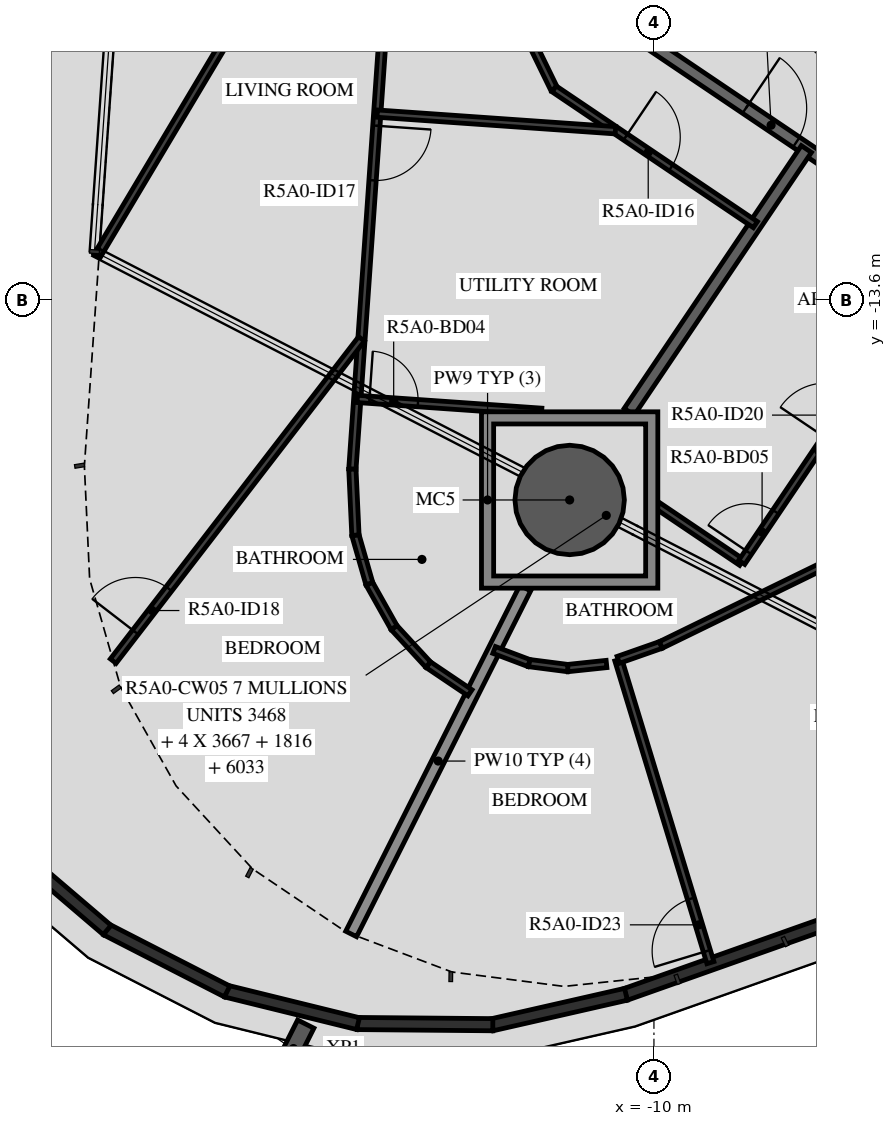
"""IFC4 building model, lengths in metres.
Left out: names, types, materials, properties, quantities, classifications, styles, units other than length and angle.
Written with IfcOpenShell. Run it as: python <this file> out.ifc"""

import sys

from ifc_helpers import new_model, si_unit, direction, frame, frame_2d, origin, origin_2d, place, context, subcontext, project, spatial, polyline, rectangle, hollow_circle, i_section, outline, extrude, element, fill, save


model = new_model("IFC4")
c1 = context("Model", 3, precision=1e-05, world=origin(), true_north=direction((0.0, 1.0)))
c2 = subcontext(c1, "Body", "Model", "MODEL_VIEW")
j1 = project(units=[si_unit("LENGTHUNIT", "METRE"), si_unit("PLANEANGLEUNIT", "RADIAN")], contexts=[c1])
p1 = place(None, origin())
s1 = spatial("IfcSite", under=j1, at=p1, CompositionType="ELEMENT")
p2 = place(p1, origin())
s2 = spatial("IfcBuilding", under=s1, at=p2, CompositionType="ELEMENT")
p3 = place(p2, frame((0.0, 0.0, 188.4)))
s3 = spatial("IfcBuildingStorey", under=s2, at=p3, CompositionType="ELEMENT", Elevation=188.4)
p4 = place(p3, frame((-11.386, -16.881, -0.45), z_axis=(0.0, 0.0, 1.0), x_axis=(1.0, 0.0, 0.0)))
e1 = element("IfcColumn", 1, at=p4, inside=s3, PredefinedType="COLUMN", context=c2, shape_type="SweptSolid", body=[
    extrude(hollow_circle(Radius=0.9, WallThickness=0.04, at=origin_2d()), origin(), (0.0, 0.0, 1.0), 3.57),
])
p5 = place(p3, frame((-15.928, -25.902, -0.45), z_axis=(0.0, 0.0, 1.0), x_axis=(-0.893169071277, 0.449721035881, 0.0)))
e2 = element("IfcColumn", 2, at=p5, inside=s3, PredefinedType="COLUMN", context=c2, shape_type="SweptSolid", body=[
    extrude(i_section(OverallWidth=0.3, OverallDepth=0.9, WebThickness=0.019, FlangeThickness=0.035, FilletRadius=0.03, at=origin_2d()), origin(), (0.0, 0.0, 1.0), 3.57),
])
p6 = place(p3, frame((6.704, -18.931, 0.03), z_axis=(0.0, 0.0, 1.0), x_axis=(-0.942641899569, -0.33380570573, 0.0)))
e3 = element("IfcWall", 3, at=p6, inside=s3, PredefinedType="PARAPET", context=c2, shape_type="SweptSolid", body=[
    extrude(rectangle(XDim=18.214, YDim=0.2, at=frame_2d((9.107, 0.0))), origin(), (0.0, 0.0, 1.0), 1.5),
])
p7 = place(p3, frame((-10.46, -25.01, 0.03), z_axis=(0.0, 0.0, 1.0), x_axis=(-0.97501799573, -0.222125883233, 0.0)))
e4 = element("IfcWall", 4, at=p7, inside=s3, PredefinedType="PARAPET", context=c2, shape_type="SweptSolid", body=[
    extrude(rectangle(XDim=2.258, YDim=0.2, at=frame_2d((1.129, 0.0))), origin(), (0.0, 0.0, 1.0), 1.5),
])
p8 = place(p3, frame((-12.65, -25.51, 0.03), z_axis=(0.0, 0.0, 1.0), x_axis=(-0.999961579411, 0.008765825811, 0.0)))
e5 = element("IfcWall", 5, at=p8, inside=s3, PredefinedType="PARAPET", context=c2, shape_type="SweptSolid", body=[
    extrude(rectangle(XDim=2.228, YDim=0.2, at=frame_2d((1.114, 0.0))), origin(), (0.0, 0.0, 1.0), 1.5),
])
p9 = place(p3, frame((-14.866, -25.492, 0.03), z_axis=(0.0, 0.0, 1.0), x_axis=(-0.971000010304, 0.239079442844, 0.0)))
e6 = element("IfcWall", 6, at=p9, inside=s3, PredefinedType="PARAPET", context=c2, shape_type="SweptSolid", body=[
    extrude(rectangle(XDim=2.228, YDim=0.2, at=frame_2d((1.114, 0.0))), origin(), (0.0, 0.0, 1.0), 1.5),
])
p10 = place(p3, frame((-17.019, -24.963, 0.03), z_axis=(0.0, 0.0, 1.0), x_axis=(-0.889733029007, 0.456481256015, 0.0)))
e7 = element("IfcWall", 7, at=p10, inside=s3, PredefinedType="PARAPET", context=c2, shape_type="SweptSolid", body=[
    extrude(rectangle(XDim=2.228, YDim=0.2, at=frame_2d((1.114, 0.0))), origin(), (0.0, 0.0, 1.0), 1.5),
])
p11 = place(p3, frame((-18.992, -23.952, 0.03), z_axis=(0.0, 0.0, 1.0), x_axis=(-0.760369169172, 0.649491128941, 0.0)))
e8 = element("IfcWall", 8, at=p11, inside=s3, PredefinedType="PARAPET", context=c2, shape_type="SweptSolid", body=[
    extrude(rectangle(XDim=2.228, YDim=0.2, at=frame_2d((1.114, 0.0))), origin(), (0.0, 0.0, 1.0), 1.5),
])
p12 = place(p3, frame((-23.066, -14.25, 0.03), z_axis=(0.0, 0.0, 1.0), x_axis=(0.182236609877, 0.983254706585, 0.0)))
e9 = element("IfcWall", 9, at=p12, inside=s3, PredefinedType="PARAPET", context=c2, shape_type="SweptSolid", body=[
    extrude(rectangle(XDim=36.429, YDim=0.2, at=frame_2d((18.214, 0.0))), origin(), (0.0, 0.0, 1.0), 1.5),
])
p13 = place(p3, frame((-10.47, -9.101, 0.0), z_axis=(0.0, 0.0, 1.0), x_axis=(0.829035841718, -0.559195469534, 0.0)))
e10 = element("IfcWall", 10, at=p13, inside=s3, PredefinedType="STANDARD", context=c2, shape_type="SweptSolid", body=[
    extrude(rectangle(XDim=7.181, YDim=0.2, at=frame_2d((3.591, 0.0))), origin(), (0.0, 0.0, 1.0), 3.12),
])
p14 = place(p13, frame((2.39, 0.0, 0.0)))
e11 = element("IfcOpeningElement", 11, at=p14, cuts=e10, PredefinedType="OPENING", context=c2, shape_type="SweptSolid", body=[
    extrude(rectangle(XDim=1.0, YDim=2.1, at=frame_2d((0.5, 1.05))), frame((0.0, 0.11, 0.0), z_axis=(0.0, -1.0, 0.0), x_axis=(1.0, 0.0, 0.0)), (0.0, 0.0, 1.0), 0.22),
])
p15 = place(p3, frame((-10.407, -15.43, 0.0), z_axis=(0.0, 0.0, 1.0), x_axis=(0.559038328133, 0.829141813973, 0.0)))
e12 = element("IfcWall", 12, at=p15, inside=s3, PredefinedType="STANDARD", context=c2, shape_type="SweptSolid", body=[
    extrude(rectangle(XDim=5.212, YDim=0.2, at=frame_2d((2.606, 0.0))), origin(), (0.0, 0.0, 1.0), 3.12),
])
p16 = place(p3, frame((-14.979, -24.017, 0.0), z_axis=(0.0, 0.0, 1.0), x_axis=(0.449711952388, 0.893173644864, 0.0)))
e13 = element("IfcWall", 13, at=p16, inside=s3, PredefinedType="STANDARD", context=c2, shape_type="SweptSolid", body=[
    extrude(rectangle(XDim=6.367, YDim=0.2, at=frame_2d((3.184, 0.0))), origin(), (0.0, 0.0, 1.0), 2.73),
])
p17 = place(p3, frame((-13.715, -5.87, 0.0), z_axis=(0.0, 0.0, 1.0), x_axis=(0.438372766482, -0.89879325632, 0.0)))
e14 = element("IfcWall", 14, at=p17, inside=s3, PredefinedType="PARTITIONING", context=c2, shape_type="SweptSolid", body=[
    extrude(rectangle(XDim=4.728, YDim=0.12, at=frame_2d((2.364, 0.0))), origin(), (0.0, 0.0, 1.0), 3.12),
])
p18 = place(p17, frame((0.4, 0.0, 0.0)))
e15 = element("IfcOpeningElement", 15, at=p18, cuts=e14, PredefinedType="OPENING", context=c2, shape_type="SweptSolid", body=[
    extrude(rectangle(XDim=0.9, YDim=2.1, at=frame_2d((0.45, 1.05))), frame((0.0, 0.07, 0.0), z_axis=(0.0, -1.0, 0.0), x_axis=(1.0, 0.0, 0.0)), (0.0, 0.0, 1.0), 0.14),
])
p19 = place(p3, frame((-11.642, -10.12, 0.0), z_axis=(0.0, 0.0, 1.0), x_axis=(0.829018066952, -0.559221820629, 0.0)))
e16 = element("IfcWall", 16, at=p19, inside=s3, PredefinedType="PARTITIONING", context=c2, shape_type="SweptSolid", body=[
    extrude(rectangle(XDim=3.992, YDim=0.12, at=frame_2d((1.996, 0.0))), origin(), (0.0, 0.0, 1.0), 3.12),
])
p20 = place(p19, frame((1.417, 0.0, 0.0)))
e17 = element("IfcOpeningElement", 17, at=p20, cuts=e16, PredefinedType="OPENING", context=c2, shape_type="SweptSolid", body=[
    extrude(rectangle(XDim=0.9, YDim=2.1, at=frame_2d((0.45, 1.05))), frame((0.0, 0.07, 0.0), z_axis=(0.0, -1.0, 0.0), x_axis=(1.0, 0.0, 0.0)), (0.0, 0.0, 1.0), 0.14),
])
p21 = place(p3, frame((-19.156, -12.863, 0.0), z_axis=(0.0, 0.0, 1.0), x_axis=(0.512316386407, 0.858796786335, 0.0)))
e18 = element("IfcWall", 18, at=p21, inside=s3, PredefinedType="PARTITIONING", context=c2, shape_type="SweptSolid", body=[
    extrude(rectangle(XDim=7.963, YDim=0.12, at=frame_2d((3.981, 0.0))), origin(), (0.0, 0.0, 1.0), 3.12),
])
p22 = place(p3, frame((-14.229, -5.929, 0.0), z_axis=(0.0, 0.0, 1.0), x_axis=(-0.069740723375, -0.997565151508, 0.0)))
e19 = element("IfcWall", 19, at=p22, inside=s3, PredefinedType="PARTITIONING", context=c2, shape_type="SweptSolid", body=[
    extrude(rectangle(XDim=10.47, YDim=0.12, at=frame_2d((5.235, 0.0))), origin(), (0.0, 0.0, 1.0), 3.12),
])
p23 = place(p22, frame((4.809, 0.0, 0.0)))
e20 = element("IfcOpeningElement", 20, at=p23, cuts=e19, PredefinedType="OPENING", context=c2, shape_type="SweptSolid", body=[
    extrude(rectangle(XDim=0.9, YDim=2.1, at=frame_2d((0.45, 1.05))), frame((0.0, 0.07, 0.0), z_axis=(0.0, -1.0, 0.0), x_axis=(1.0, 0.0, 0.0)), (0.0, 0.0, 1.0), 0.14),
])
p24 = place(p22, frame((1.0, 0.0, 0.0)))
e21 = element("IfcOpeningElement", 21, at=p24, cuts=e19, PredefinedType="OPENING", context=c2, shape_type="SweptSolid", body=[
    extrude(rectangle(XDim=0.9, YDim=2.1, at=frame_2d((0.45, 1.05))), frame((0.0, 0.07, 0.0), z_axis=(0.0, -1.0, 0.0), x_axis=(1.0, 0.0, 0.0)), (0.0, 0.0, 1.0), 0.14),
])
p25 = place(p3, frame((-14.551, -10.527, 0.0), z_axis=(0.0, 0.0, 1.0), x_axis=(0.997564247633, -0.069753651118, 0.0)))
e22 = element("IfcWall", 22, at=p25, inside=s3, PredefinedType="PARTITIONING", context=c2, shape_type="SweptSolid", body=[
    extrude(rectangle(XDim=3.927, YDim=0.12, at=frame_2d((1.963, 0.0))), origin(), (0.0, 0.0, 1.0), 3.12),
])
p26 = place(p3, frame((-18.892, -19.531, 0.0), z_axis=(0.0, 0.0, 1.0), x_axis=(0.610326128317, 0.792150249065, 0.0)))
e23 = element("IfcWall", 23, at=p26, inside=s3, PredefinedType="PARTITIONING", context=c2, shape_type="SweptSolid", body=[
    extrude(rectangle(XDim=6.689, YDim=0.12, at=frame_2d((3.345, 0.0))), origin(), (0.0, 0.0, 1.0), 3.12),
])
p27 = place(p26, frame((0.6, 0.0, 0.0)))
e24 = element("IfcOpeningElement", 24, at=p27, cuts=e23, PredefinedType="OPENING", context=c2, shape_type="SweptSolid", body=[
    extrude(rectangle(XDim=0.9, YDim=2.1, at=frame_2d((0.45, 1.05))), frame((0.0, 0.07, 0.0), z_axis=(0.0, -1.0, 0.0), x_axis=(1.0, 0.0, 0.0)), (0.0, 0.0, 1.0), 0.14),
])
p28 = place(p3, frame((-14.879, -15.219, 0.0), z_axis=(0.0, 0.0, 1.0), x_axis=(0.997566012813, -0.069728402248, 0.0)))
e25 = element("IfcWall", 25, at=p28, inside=s3, PredefinedType="PARTITIONING", context=c2, shape_type="SweptSolid", body=[
    extrude(rectangle(XDim=3.039, YDim=0.12, at=frame_2d((1.52, 0.0))), origin(), (0.0, 0.0, 1.0), 3.12),
])
p29 = place(p28, frame((0.2, 0.0, 0.0)))
e26 = element("IfcOpeningElement", 26, at=p29, cuts=e25, PredefinedType="OPENING", context=c2, shape_type="SweptSolid", body=[
    extrude(rectangle(XDim=0.8, YDim=2.1, at=frame_2d((0.4, 1.05))), frame((0.0, 0.07, 0.0), z_axis=(0.0, -1.0, 0.0), x_axis=(1.0, 0.0, 0.0)), (0.0, 0.0, 1.0), 0.14),
])
for number, where, z_axis, x_axis in (
    (27, (-13.025, -20.052, 0.0), (0.0, 0.0, 1.0), (-0.829, 0.559, 0.0)),
    (28, (-13.712, -19.588, 0.0), (0.0, 0.0, 1.0), (-0.678, 0.735, 0.0)),
):
    element("IfcWall", number, at=place(p3, frame(where, z_axis=z_axis, x_axis=x_axis)), inside=s3, PredefinedType="PARTITIONING", context=c2, shape_type="SweptSolid", body=[
        extrude(rectangle(XDim=0.829, YDim=0.12, at=frame_2d((0.415, 0.0))), origin(), (0.0, 0.0, 1.0), 3.12),
    ])
p30 = place(p3, frame((-14.274, -18.979, 0.0), z_axis=(0.0, 0.0, 1.0), x_axis=(-0.490037513137, 0.871701345484, 0.0)))
e29 = element("IfcWall", 29, at=p30, inside=s3, PredefinedType="PARTITIONING", context=c2, shape_type="SweptSolid", body=[
    extrude(rectangle(XDim=0.829, YDim=0.12, at=frame_2d((0.415, 0.0))), origin(), (0.0, 0.0, 1.0), 3.12),
])
p31 = place(p3, frame((-14.68, -18.256, 0.0), z_axis=(0.0, 0.0, 1.0), x_axis=(-0.275382358468, 0.961334778651, 0.0)))
e30 = element("IfcWall", 30, at=p31, inside=s3, PredefinedType="PARTITIONING", context=c2, shape_type="SweptSolid", body=[
    extrude(rectangle(XDim=0.829, YDim=0.12, at=frame_2d((0.415, 0.0))), origin(), (0.0, 0.0, 1.0), 3.12),
])
p32 = place(p3, frame((-14.909, -17.459, 0.0), z_axis=(0.0, 0.0, 1.0), x_axis=(-0.046497887649, 0.99891838828, 0.0)))
e31 = element("IfcWall", 31, at=p32, inside=s3, PredefinedType="PARTITIONING", context=c2, shape_type="SweptSolid", body=[
    extrude(rectangle(XDim=1.087, YDim=0.12, at=frame_2d((0.543, 0.0))), origin(), (0.0, 0.0, 1.0), 3.12),
])
p33 = place(p3, frame((-9.936, -16.976, 0.0), z_axis=(0.0, 0.0, 1.0), x_axis=(0.829057888835, -0.559162782167, 0.0)))
e32 = element("IfcWall", 32, at=p33, inside=s3, PredefinedType="PARTITIONING", context=c2, shape_type="SweptSolid", body=[
    extrude(rectangle(XDim=1.664, YDim=0.12, at=frame_2d((0.832, 0.0))), origin(), (0.0, 0.0, 1.0), 3.12),
])
p34 = place(p3, frame((-8.557, -17.906, 0.0), z_axis=(0.0, 0.0, 1.0), x_axis=(0.559194471553, 0.829036514868, 0.0)))
e33 = element("IfcWall", 33, at=p34, inside=s3, PredefinedType="PARTITIONING", context=c2, shape_type="SweptSolid", body=[
    extrude(rectangle(XDim=4.73, YDim=0.12, at=frame_2d((2.365, 0.0))), origin(), (0.0, 0.0, 1.0), 3.12),
])
p35 = place(p34, frame((0.2, 0.0, 0.0)))
e34 = element("IfcOpeningElement", 34, at=p35, cuts=e33, PredefinedType="OPENING", context=c2, shape_type="SweptSolid", body=[
    extrude(rectangle(XDim=0.8, YDim=2.1, at=frame_2d((0.4, 1.05))), frame((0.0, 0.07, 0.0), z_axis=(0.0, -1.0, 0.0), x_axis=(1.0, 0.0, 0.0)), (0.0, 0.0, 1.0), 0.14),
])
p36 = place(p34, frame((2.471, 0.0, 0.0)))
e35 = element("IfcOpeningElement", 35, at=p36, cuts=e33, PredefinedType="OPENING", context=c2, shape_type="SweptSolid", body=[
    extrude(rectangle(XDim=0.9, YDim=2.1, at=frame_2d((0.45, 1.05))), frame((0.0, 0.07, 0.0), z_axis=(0.0, -1.0, 0.0), x_axis=(1.0, 0.0, 0.0)), (0.0, 0.0, 1.0), 0.14),
])
p37 = place(p3, frame((-10.78, -19.578, 0.0), z_axis=(0.0, 0.0, 1.0), x_axis=(-0.994515867502, -0.104585798686, 0.0)))
e36 = element("IfcWall", 36, at=p37, inside=s3, PredefinedType="PARTITIONING", context=c2, shape_type="SweptSolid", body=[
    extrude(rectangle(XDim=0.642, YDim=0.12, at=frame_2d((0.321, 0.0))), origin(), (0.0, 0.0, 1.0), 3.12),
])
p38 = place(p3, frame((-11.418, -19.645, 0.0), z_axis=(0.0, 0.0, 1.0), x_axis=(-0.991802759529, 0.127778269633, 0.0)))
e37 = element("IfcWall", 37, at=p38, inside=s3, PredefinedType="PARTITIONING", context=c2, shape_type="SweptSolid", body=[
    extrude(rectangle(XDim=0.642, YDim=0.12, at=frame_2d((0.321, 0.0))), origin(), (0.0, 0.0, 1.0), 3.12),
])
p39 = place(p3, frame((-12.055, -19.563, 0.0), z_axis=(0.0, 0.0, 1.0), x_axis=(-0.935507243946, 0.353307509862, 0.0)))
e38 = element("IfcWall", 38, at=p39, inside=s3, PredefinedType="PARTITIONING", context=c2, shape_type="SweptSolid", body=[
    extrude(rectangle(XDim=0.612, YDim=0.12, at=frame_2d((0.306, 0.0))), origin(), (0.0, 0.0, 1.0), 3.12),
])
p40 = place(p3, frame((-9.072, -24.489, 0.0), z_axis=(0.0, 0.0, 1.0), x_axis=(-0.291025348593, 0.956715342449, 0.0)))
e39 = element("IfcWall", 39, at=p40, inside=s3, PredefinedType="PARTITIONING", context=c2, shape_type="SweptSolid", body=[
    extrude(rectangle(XDim=5.205, YDim=0.12, at=frame_2d((2.602, 0.0))), origin(), (0.0, 0.0, 1.0), 3.12),
])
p41 = place(p40, frame((0.2, 0.0, 0.0)))
e40 = element("IfcOpeningElement", 40, at=p41, cuts=e39, PredefinedType="OPENING", context=c2, shape_type="SweptSolid", body=[
    extrude(rectangle(XDim=0.9, YDim=2.1, at=frame_2d((0.45, 1.05))), frame((0.0, 0.07, 0.0), z_axis=(0.0, -1.0, 0.0), x_axis=(1.0, 0.0, 0.0)), (0.0, 0.0, 1.0), 0.14),
])
p42 = place(p3, frame((-6.51, -17.617, 0.0), z_axis=(0.0, 0.0, 1.0), x_axis=(-0.438380229518, 0.898789616299, 0.0)))
e41 = element("IfcWall", 41, at=p42, inside=s3, PredefinedType="PARTITIONING", context=c2, shape_type="SweptSolid", body=[
    extrude(rectangle(XDim=1.773, YDim=0.12, at=frame_2d((0.887, 0.0))), origin(), (0.0, 0.0, 1.0), 3.12),
])
p43 = place(p3, frame((-10.586, -19.51, 0.0), z_axis=(0.0, 0.0, 1.0), x_axis=(0.943560277016, 0.3312008509, 0.0)))
e42 = element("IfcWall", 42, at=p43, inside=s3, PredefinedType="PARTITIONING", context=c2, shape_type="SweptSolid", body=[
    extrude(rectangle(XDim=0.741, YDim=0.12, at=frame_2d((0.371, 0.0))), origin(), (0.0, 0.0, 1.0), 3.12),
])
p44 = place(p3, frame((-9.886, -19.264, 0.0), z_axis=(0.0, 0.0, 1.0), x_axis=(0.898796326112, 0.43836647245, 0.0)))
e43 = element("IfcWall", 43, at=p44, inside=s3, PredefinedType="PARTITIONING", context=c2, shape_type="SweptSolid", body=[
    extrude(rectangle(XDim=10.014, YDim=0.12, at=frame_2d((5.007, 0.0))), origin(), (0.0, 0.0, 1.0), 3.12),
])
p45 = place(p44, frame((3.917, 0.0, 0.0)))
e44 = element("IfcOpeningElement", 44, at=p45, cuts=e43, PredefinedType="OPENING", context=c2, shape_type="SweptSolid", body=[
    extrude(rectangle(XDim=0.9, YDim=2.1, at=frame_2d((0.45, 1.05))), frame((0.0, 0.07, 0.0), z_axis=(0.0, -1.0, 0.0), x_axis=(1.0, 0.0, 0.0)), (0.0, 0.0, 1.0), 0.14),
])
p46 = place(p3, origin())
e45 = element("IfcWall", 45, at=p46, inside=s3, PredefinedType="STANDARD", context=c2, shape_type="SweptSolid", body=[
    extrude(outline(polyline([(-9.936, -15.43), (-9.936, -18.331), (-12.836, -18.331), (-12.836, -15.43), (-9.936, -15.43)]), holes=[polyline([(-12.636, -18.131), (-10.136, -18.131), (-10.136, -15.631), (-12.636, -15.631), (-12.636, -18.131)])]), origin(), (0.0, 0.0, 1.0), 3.12),
])
p47 = place(p14, origin())
e46 = element("IfcDoor", 46, at=p47, inside=s3, OperationType="SINGLE_SWING_RIGHT", PredefinedType="DOOR", context=c2, shape_type="SweptSolid", body=[
    extrude(rectangle(XDim=1.0, YDim=2.1, at=frame_2d((0.5, 1.05))), frame((0.0, 0.025, 0.0), z_axis=(0.0, -1.0, 0.0), x_axis=(1.0, 0.0, 0.0)), (0.0, 0.0, 1.0), 0.05),
])
fill(e11, e46)
p48 = place(p20, origin())
e47 = element("IfcDoor", 47, at=p48, inside=s3, OperationType="SINGLE_SWING_RIGHT", PredefinedType="DOOR", context=c2, shape_type="SweptSolid", body=[
    extrude(rectangle(XDim=0.9, YDim=2.1, at=frame_2d((0.45, 1.05))), frame((0.0, 0.025, 0.0), z_axis=(0.0, -1.0, 0.0), x_axis=(1.0, 0.0, 0.0)), (0.0, 0.0, 1.0), 0.05),
])
fill(e17, e47)
p49 = place(p23, origin())
e48 = element("IfcDoor", 48, at=p49, inside=s3, OperationType="SINGLE_SWING_RIGHT", PredefinedType="DOOR", context=c2, shape_type="SweptSolid", body=[
    extrude(rectangle(XDim=0.9, YDim=2.1, at=frame_2d((0.45, 1.05))), frame((0.0, 0.025, 0.0), z_axis=(0.0, -1.0, 0.0), x_axis=(1.0, 0.0, 0.0)), (0.0, 0.0, 1.0), 0.05),
])
fill(e20, e48)
p50 = place(p29, origin())
e49 = element("IfcDoor", 49, at=p50, inside=s3, OperationType="SINGLE_SWING_RIGHT", PredefinedType="DOOR", context=c2, shape_type="SweptSolid", body=[
    extrude(rectangle(XDim=0.8, YDim=2.1, at=frame_2d((0.4, 1.05))), frame((0.0, 0.025, 0.0), z_axis=(0.0, -1.0, 0.0), x_axis=(1.0, 0.0, 0.0)), (0.0, 0.0, 1.0), 0.05),
])
fill(e26, e49)
p51 = place(p27, origin())
e50 = element("IfcDoor", 50, at=p51, inside=s3, OperationType="SINGLE_SWING_RIGHT", PredefinedType="DOOR", context=c2, shape_type="SweptSolid", body=[
    extrude(rectangle(XDim=0.9, YDim=2.1, at=frame_2d((0.45, 1.05))), frame((0.0, 0.025, 0.0), z_axis=(0.0, -1.0, 0.0), x_axis=(1.0, 0.0, 0.0)), (0.0, 0.0, 1.0), 0.05),
])
fill(e24, e50)
p52 = place(p35, origin())
e51 = element("IfcDoor", 51, at=p52, inside=s3, OperationType="SINGLE_SWING_LEFT", PredefinedType="DOOR", context=c2, shape_type="SweptSolid", body=[
    extrude(rectangle(XDim=0.8, YDim=2.1, at=frame_2d((0.4, 1.05))), frame((0.0, 0.025, 0.0), z_axis=(0.0, -1.0, 0.0), x_axis=(1.0, 0.0, 0.0)), (0.0, 0.0, 1.0), 0.05),
])
fill(e34, e51)
p53 = place(p41, origin())
e52 = element("IfcDoor", 52, at=p53, inside=s3, OperationType="SINGLE_SWING_LEFT", PredefinedType="DOOR", context=c2, shape_type="SweptSolid", body=[
    extrude(rectangle(XDim=0.9, YDim=2.1, at=frame_2d((0.45, 1.05))), frame((0.0, 0.025, 0.0), z_axis=(0.0, -1.0, 0.0), x_axis=(1.0, 0.0, 0.0)), (0.0, 0.0, 1.0), 0.05),
])
fill(e40, e52)
save(model, sys.argv[1])
